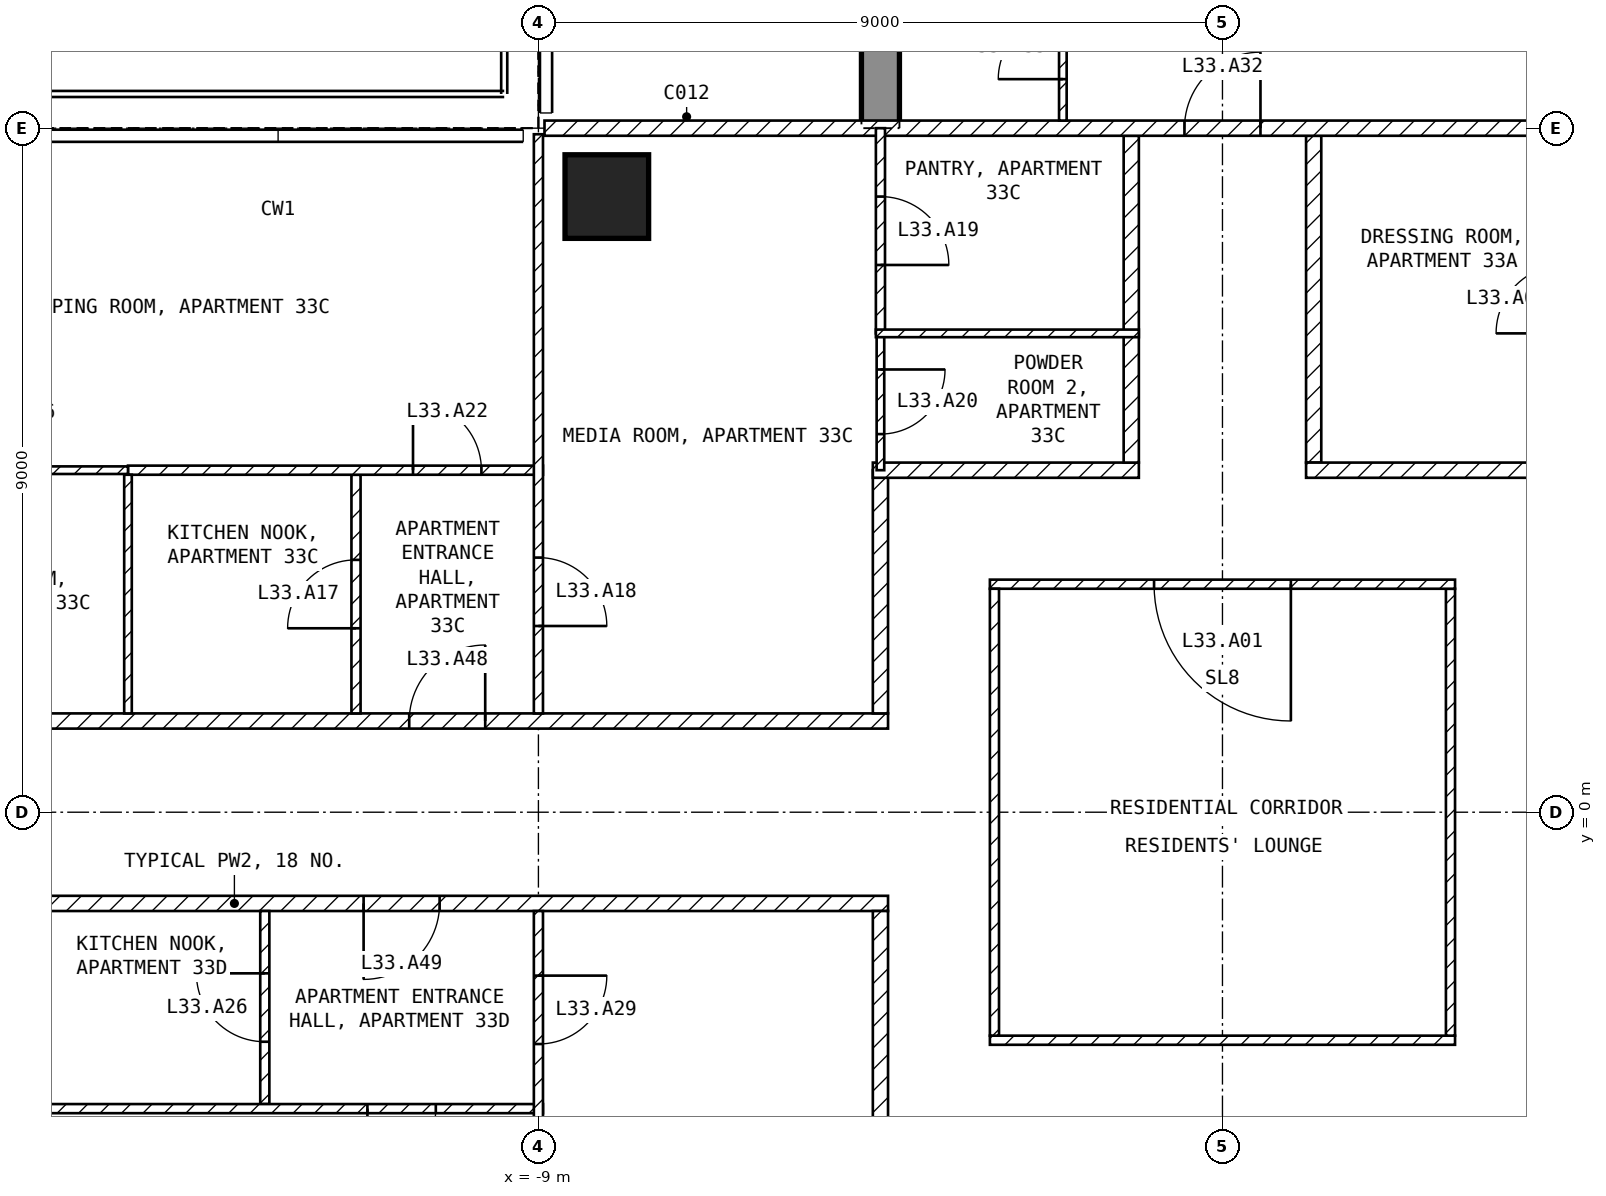
"""IFC4 building model, lengths in metres.
Left out: names, types, materials, properties, quantities, classifications, styles, units other than length and angle.
Written with IfcOpenShell. Run it as: python <this file> out.ifc"""

import sys

from ifc_helpers import new_model, si_unit, direction, frame, frame_2d, origin, origin_2d, place, context, subcontext, project, spatial, polyline, rectangle, outline, extrude, element, fill, save


model = new_model("IFC4")
c1 = context("Model", 3, precision=1e-05, world=origin(), true_north=direction((0.0, 1.0)))
c2 = subcontext(c1, "Body", "Model", "MODEL_VIEW")
j1 = project(units=[si_unit("LENGTHUNIT", "METRE"), si_unit("PLANEANGLEUNIT", "RADIAN")], contexts=[c1])
p1 = place(None, origin())
s1 = spatial("IfcSite", under=j1, at=p1, CompositionType="ELEMENT")
p2 = place(p1, origin())
s2 = spatial("IfcBuilding", under=s1, at=p2, CompositionType="ELEMENT")
p3 = place(p2, frame((0.0, 0.0, 137.4)))
s3 = spatial("IfcBuildingStorey", under=s2, at=p3, CompositionType="ELEMENT", Elevation=137.4)
p4 = place(p3, frame((-8.1, 8.1, -0.25), z_axis=(0.0, 0.0, 1.0), x_axis=(1.0, 0.0, 0.0)))
e1 = element("IfcColumn", 1, at=p4, inside=s3, PredefinedType="COLUMN", context=c2, shape_type="SweptSolid", body=[
    extrude(rectangle(XDim=1.1, YDim=1.1, at=origin_2d()), origin(), (0.0, 0.0, 1.0), 3.5),
])
p5 = place(p3, frame((-4.75, 9.0, -0.25), z_axis=(1.0, 0.0, 0.0), x_axis=(0.0, 1.0, 0.0)))
e2 = element("IfcWall", 2, at=p5, inside=s3, PredefinedType="SHEAR", context=c2, shape_type="SweptSolid", body=[
    extrude(outline(polyline([(0.0, 0.0), (2.1, 0.0), (2.1, 2.65), (4.5, 2.65), (4.5, 0.0), (9.9, 0.0), (9.9, 2.65), (12.3, 2.65), (12.3, 0.0), (16.55, 0.0), (16.55, 3.5), (0.0, 3.5), (0.0, 0.0)])), origin(), (0.0, 0.0, 1.0), 0.5),
])
p6 = place(p3, frame((-3.06, -3.0, 0.0), z_axis=(0.0, 0.0, 1.0), x_axis=(1.0, 0.0, 0.0)))
e3 = element("IfcWall", 3, at=p6, inside=s3, PredefinedType="PARTITIONING", context=c2, shape_type="SweptSolid", body=[
    extrude(rectangle(XDim=6.12, YDim=0.12, at=frame_2d((3.06, 0.0))), origin(), (0.0, 0.0, 1.0), 3.25),
])
p7 = place(p3, frame((3.0, -2.94, 0.0), z_axis=(0.0, 0.0, 1.0), x_axis=(0.0, 1.0, 0.0)))
e4 = element("IfcWall", 4, at=p7, inside=s3, PredefinedType="PARTITIONING", context=c2, shape_type="SweptSolid", body=[
    extrude(rectangle(XDim=5.88, YDim=0.12, at=frame_2d((2.94, 0.0))), origin(), (0.0, 0.0, 1.0), 3.25),
])
p8 = place(p3, frame((3.06, 3.0, 0.0), z_axis=(0.0, 0.0, 1.0), x_axis=(-1.0, 0.0, 0.0)))
e5 = element("IfcWall", 5, at=p8, inside=s3, PredefinedType="PARTITIONING", context=c2, shape_type="SweptSolid", body=[
    extrude(rectangle(XDim=6.12, YDim=0.12, at=frame_2d((3.06, 0.0))), origin(), (0.0, 0.0, 1.0), 3.25),
])
p9 = place(p8, frame((2.16, 0.0, 0.0)))
e6 = element("IfcOpeningElement", 6, at=p9, cuts=e5, PredefinedType="OPENING", context=c2, shape_type="SweptSolid", body=[
    extrude(rectangle(XDim=1.8, YDim=2.1, at=frame_2d((0.9, 1.05))), frame((0.0, 0.07, 0.0), z_axis=(0.0, -1.0, 0.0), x_axis=(1.0, 0.0, 0.0)), (0.0, 0.0, 1.0), 0.14),
])
p10 = place(p3, frame((-3.0, 2.94, 0.0), z_axis=(0.0, 0.0, 1.0), x_axis=(0.0, -1.0, 0.0)))
e7 = element("IfcWall", 7, at=p10, inside=s3, PredefinedType="PARTITIONING", context=c2, shape_type="SweptSolid", body=[
    extrude(rectangle(XDim=5.88, YDim=0.12, at=frame_2d((2.94, 0.0))), origin(), (0.0, 0.0, 1.0), 3.25),
])
p11 = place(p3, frame((1.2, 8.9, 0.0), z_axis=(0.0, 0.0, 1.0), x_axis=(0.0, -1.0, 0.0)))
e8 = element("IfcWall", 8, at=p11, inside=s3, PredefinedType="PARTITIONING", context=c2, shape_type="SweptSolid", body=[
    extrude(rectangle(XDim=4.3, YDim=0.2, at=frame_2d((2.15, 0.0))), origin(), (0.0, 0.0, 1.0), 3.25),
])
p12 = place(p3, frame((1.1, 4.5, 0.0), z_axis=(0.0, 0.0, 1.0), x_axis=(1.0, 0.0, 0.0)))
e9 = element("IfcWall", 9, at=p12, inside=s3, PredefinedType="PARTITIONING", context=c2, shape_type="SweptSolid", body=[
    extrude(rectangle(XDim=3.5, YDim=0.2, at=frame_2d((1.75, 0.0))), origin(), (0.0, 0.0, 1.0), 3.25),
])
p13 = place(p3, frame((-21.6, 1.2, 0.0), z_axis=(0.0, 0.0, 1.0), x_axis=(1.0, 0.0, 0.0)))
e10 = element("IfcWall", 10, at=p13, inside=s3, PredefinedType="PARTITIONING", context=c2, shape_type="SweptSolid", body=[
    extrude(rectangle(XDim=17.2, YDim=0.2, at=frame_2d((8.6, 0.0))), origin(), (0.0, 0.0, 1.0), 3.25),
])
p14 = place(p13, frame((10.9, 0.0, 0.0)))
e11 = element("IfcOpeningElement", 11, at=p14, cuts=e10, PredefinedType="OPENING", context=c2, shape_type="SweptSolid", body=[
    extrude(rectangle(XDim=1.0, YDim=2.1, at=frame_2d((0.5, 1.05))), frame((0.0, 0.11, 0.0), z_axis=(0.0, -1.0, 0.0), x_axis=(1.0, 0.0, 0.0)), (0.0, 0.0, 1.0), 0.22),
])
p15 = place(p3, frame((-4.5, 1.3, 0.0), z_axis=(0.0, 0.0, 1.0), x_axis=(0.0, 1.0, 0.0)))
e12 = element("IfcWall", 12, at=p15, inside=s3, PredefinedType="PARTITIONING", context=c2, shape_type="SweptSolid", body=[
    extrude(rectangle(XDim=3.2, YDim=0.2, at=frame_2d((1.6, 0.0))), origin(), (0.0, 0.0, 1.0), 3.25),
])
p16 = place(p3, frame((-4.6, 4.5, 0.0), z_axis=(0.0, 0.0, 1.0), x_axis=(1.0, 0.0, 0.0)))
e13 = element("IfcWall", 13, at=p16, inside=s3, PredefinedType="PARTITIONING", context=c2, shape_type="SweptSolid", body=[
    extrude(rectangle(XDim=3.5, YDim=0.2, at=frame_2d((1.75, 0.0))), origin(), (0.0, 0.0, 1.0), 3.25),
])
p17 = place(p3, frame((-1.2, 4.6, 0.0), z_axis=(0.0, 0.0, 1.0), x_axis=(0.0, 1.0, 0.0)))
e14 = element("IfcWall", 14, at=p17, inside=s3, PredefinedType="PARTITIONING", context=c2, shape_type="SweptSolid", body=[
    extrude(rectangle(XDim=4.3, YDim=0.2, at=frame_2d((2.15, 0.0))), origin(), (0.0, 0.0, 1.0), 3.25),
])
p18 = place(p3, frame((-4.4, -1.2, 0.0), z_axis=(0.0, 0.0, 1.0), x_axis=(-1.0, 0.0, 0.0)))
e15 = element("IfcWall", 15, at=p18, inside=s3, PredefinedType="PARTITIONING", context=c2, shape_type="SweptSolid", body=[
    extrude(rectangle(XDim=17.2, YDim=0.2, at=frame_2d((8.6, 0.0))), origin(), (0.0, 0.0, 1.0), 3.25),
])
p19 = place(p18, frame((5.9, 0.0, 0.0)))
e16 = element("IfcOpeningElement", 16, at=p19, cuts=e15, PredefinedType="OPENING", context=c2, shape_type="SweptSolid", body=[
    extrude(rectangle(XDim=1.0, YDim=2.1, at=frame_2d((0.5, 1.05))), frame((0.0, 0.11, 0.0), z_axis=(0.0, -1.0, 0.0), x_axis=(1.0, 0.0, 0.0)), (0.0, 0.0, 1.0), 0.22),
])
p20 = place(p3, frame((-4.5, -4.5, 0.0), z_axis=(0.0, 0.0, 1.0), x_axis=(0.0, 1.0, 0.0)))
e17 = element("IfcWall", 17, at=p20, inside=s3, PredefinedType="PARTITIONING", context=c2, shape_type="SweptSolid", body=[
    extrude(rectangle(XDim=3.2, YDim=0.2, at=frame_2d((1.6, 0.0))), origin(), (0.0, 0.0, 1.0), 3.25),
])
p21 = place(p3, frame((-8.92, 9.0, 0.0), z_axis=(0.0, 0.0, 1.0), x_axis=(1.0, 0.0, 0.0)))
e18 = element("IfcWall", 18, at=p21, inside=s3, PredefinedType="PARTITIONING", context=c2, shape_type="SweptSolid", body=[
    extrude(rectangle(XDim=17.84, YDim=0.2, at=frame_2d((8.92, 0.0))), origin(), (0.0, 0.0, 1.0), 3.25),
])
p22 = place(p21, frame((8.42, 0.0, 0.0)))
e19 = element("IfcOpeningElement", 19, at=p22, cuts=e18, PredefinedType="OPENING", context=c2, shape_type="SweptSolid", body=[
    extrude(rectangle(XDim=1.0, YDim=2.1, at=frame_2d((0.5, 1.05))), frame((0.0, 0.11, 0.0), z_axis=(0.0, -1.0, 0.0), x_axis=(1.0, 0.0, 0.0)), (0.0, 0.0, 1.0), 0.22),
])
p23 = place(p3, frame((-11.4, 1.3, 0.0), z_axis=(0.0, 0.0, 1.0), x_axis=(0.0, 1.0, 0.0)))
e20 = element("IfcWall", 20, at=p23, inside=s3, PredefinedType="PARTITIONING", context=c2, shape_type="SweptSolid", body=[
    extrude(rectangle(XDim=3.14, YDim=0.12, at=frame_2d((1.57, 0.0))), origin(), (0.0, 0.0, 1.0), 3.25),
])
p24 = place(p23, frame((1.12, 0.0, 0.0)))
e21 = element("IfcOpeningElement", 21, at=p24, cuts=e20, PredefinedType="OPENING", context=c2, shape_type="SweptSolid", body=[
    extrude(rectangle(XDim=0.9, YDim=2.1, at=frame_2d((0.45, 1.05))), frame((0.0, 0.07, 0.0), z_axis=(0.0, -1.0, 0.0), x_axis=(1.0, 0.0, 0.0)), (0.0, 0.0, 1.0), 0.14),
])
p25 = place(p3, frame((-14.4, 4.5, 0.0), z_axis=(0.0, 0.0, 1.0), x_axis=(1.0, 0.0, 0.0)))
e22 = element("IfcWall", 22, at=p25, inside=s3, PredefinedType="PARTITIONING", context=c2, shape_type="SweptSolid", body=[
    extrude(rectangle(XDim=5.46, YDim=0.12, at=frame_2d((2.73, 0.0))), origin(), (0.0, 0.0, 1.0), 3.25),
])
p26 = place(p25, frame((3.75, 0.0, 0.0)))
e23 = element("IfcOpeningElement", 23, at=p26, cuts=e22, PredefinedType="OPENING", context=c2, shape_type="SweptSolid", body=[
    extrude(rectangle(XDim=0.9, YDim=2.1, at=frame_2d((0.45, 1.05))), frame((0.0, 0.07, 0.0), z_axis=(0.0, -1.0, 0.0), x_axis=(1.0, 0.0, 0.0)), (0.0, 0.0, 1.0), 0.14),
])
p27 = place(p3, frame((-9.0, 8.92, 0.0), z_axis=(0.0, 0.0, 1.0), x_axis=(0.0, -1.0, 0.0)))
e24 = element("IfcWall", 24, at=p27, inside=s3, PredefinedType="PARTITIONING", context=c2, shape_type="SweptSolid", body=[
    extrude(rectangle(XDim=7.62, YDim=0.12, at=frame_2d((3.81, 0.0))), origin(), (0.0, 0.0, 1.0), 3.25),
])
p28 = place(p27, frame((5.57, 0.0, 0.0)))
e25 = element("IfcOpeningElement", 25, at=p28, cuts=e24, PredefinedType="OPENING", context=c2, shape_type="SweptSolid", body=[
    extrude(rectangle(XDim=0.9, YDim=2.1, at=frame_2d((0.45, 1.05))), frame((0.0, 0.07, 0.0), z_axis=(0.0, -1.0, 0.0), x_axis=(1.0, 0.0, 0.0)), (0.0, 0.0, 1.0), 0.14),
])
p29 = place(p3, frame((-14.4, 1.3, 0.0), z_axis=(0.0, 0.0, 1.0), x_axis=(0.0, 1.0, 0.0)))
e26 = element("IfcWall", 26, at=p29, inside=s3, PredefinedType="PARTITIONING", context=c2, shape_type="SweptSolid", body=[
    extrude(rectangle(XDim=3.14, YDim=0.1, at=frame_2d((1.57, 0.0))), origin(), (0.0, 0.0, 1.0), 3.25),
])
p30 = place(p3, frame((-17.4, 4.5, 0.0), z_axis=(0.0, 0.0, 1.0), x_axis=(1.0, 0.0, 0.0)))
e27 = element("IfcWall", 27, at=p30, inside=s3, PredefinedType="PARTITIONING", context=c2, shape_type="SweptSolid", body=[
    extrude(rectangle(XDim=3.0, YDim=0.1, at=frame_2d((1.5, 0.0))), origin(), (0.0, 0.0, 1.0), 3.25),
])
p31 = place(p30, frame((1.075, 0.0, 0.0)))
e28 = element("IfcOpeningElement", 28, at=p31, cuts=e27, PredefinedType="OPENING", context=c2, shape_type="SweptSolid", body=[
    extrude(rectangle(XDim=0.85, YDim=2.1, at=frame_2d((0.425, 1.05))), frame((0.0, 0.06, 0.0), z_axis=(0.0, -1.0, 0.0), x_axis=(1.0, 0.0, 0.0)), (0.0, 0.0, 1.0), 0.12),
])
p32 = place(p3, frame((-4.5, 6.3, 0.0), z_axis=(0.0, 0.0, 1.0), x_axis=(0.0, -1.0, 0.0)))
e29 = element("IfcWall", 29, at=p32, inside=s3, PredefinedType="PARTITIONING", context=c2, shape_type="SweptSolid", body=[
    extrude(rectangle(XDim=1.8, YDim=0.1, at=frame_2d((0.9, 0.0))), origin(), (0.0, 0.0, 1.0), 3.25),
])
p33 = place(p32, frame((0.475, 0.0, 0.0)))
e30 = element("IfcOpeningElement", 30, at=p33, cuts=e29, PredefinedType="OPENING", context=c2, shape_type="SweptSolid", body=[
    extrude(rectangle(XDim=0.85, YDim=2.1, at=frame_2d((0.425, 1.05))), frame((0.0, 0.06, 0.0), z_axis=(0.0, -1.0, 0.0), x_axis=(1.0, 0.0, 0.0)), (0.0, 0.0, 1.0), 0.12),
])
p34 = place(p3, frame((-4.5, 9.0, 0.0), z_axis=(0.0, 0.0, 1.0), x_axis=(0.0, -1.0, 0.0)))
e31 = element("IfcWall", 31, at=p34, inside=s3, PredefinedType="PARTITIONING", context=c2, shape_type="SweptSolid", body=[
    extrude(rectangle(XDim=2.7, YDim=0.12, at=frame_2d((1.35, 0.0))), origin(), (0.0, 0.0, 1.0), 3.25),
])
p35 = place(p34, frame((0.9, 0.0, 0.0)))
e32 = element("IfcOpeningElement", 32, at=p35, cuts=e31, PredefinedType="OPENING", context=c2, shape_type="SweptSolid", body=[
    extrude(rectangle(XDim=0.9, YDim=2.1, at=frame_2d((0.45, 1.05))), frame((0.0, 0.07, 0.0), z_axis=(0.0, -1.0, 0.0), x_axis=(1.0, 0.0, 0.0)), (0.0, 0.0, 1.0), 0.14),
])
p36 = place(p3, frame((-4.56, 6.3, 0.0), z_axis=(0.0, 0.0, 1.0), x_axis=(1.0, 0.0, 0.0)))
e33 = element("IfcWall", 33, at=p36, inside=s3, PredefinedType="PARTITIONING", context=c2, shape_type="SweptSolid", body=[
    extrude(rectangle(XDim=3.46, YDim=0.1, at=frame_2d((1.73, 0.0))), origin(), (0.0, 0.0, 1.0), 3.25),
])
p37 = place(p3, frame((-12.6, -3.84, 0.0), z_axis=(0.0, 0.0, 1.0), x_axis=(0.0, 1.0, 0.0)))
e34 = element("IfcWall", 34, at=p37, inside=s3, PredefinedType="PARTITIONING", context=c2, shape_type="SweptSolid", body=[
    extrude(rectangle(XDim=2.54, YDim=0.12, at=frame_2d((1.27, 0.0))), origin(), (0.0, 0.0, 1.0), 3.25),
])
p38 = place(p37, frame((0.82, 0.0, 0.0)))
e35 = element("IfcOpeningElement", 35, at=p38, cuts=e34, PredefinedType="OPENING", context=c2, shape_type="SweptSolid", body=[
    extrude(rectangle(XDim=0.9, YDim=2.1, at=frame_2d((0.45, 1.05))), frame((0.0, 0.07, 0.0), z_axis=(0.0, -1.0, 0.0), x_axis=(1.0, 0.0, 0.0)), (0.0, 0.0, 1.0), 0.14),
])
p39 = place(p3, frame((-8.94, -3.9, 0.0), z_axis=(0.0, 0.0, 1.0), x_axis=(-1.0, 0.0, 0.0)))
e36 = element("IfcWall", 36, at=p39, inside=s3, PredefinedType="PARTITIONING", context=c2, shape_type="SweptSolid", body=[
    extrude(rectangle(XDim=8.46, YDim=0.12, at=frame_2d((4.23, 0.0))), origin(), (0.0, 0.0, 1.0), 3.25),
])
p40 = place(p39, frame((7.11, 0.0, 0.0)))
e37 = element("IfcOpeningElement", 37, at=p40, cuts=e36, PredefinedType="OPENING", context=c2, shape_type="SweptSolid", body=[
    extrude(rectangle(XDim=0.9, YDim=2.1, at=frame_2d((0.45, 1.05))), frame((0.0, 0.07, 0.0), z_axis=(0.0, -1.0, 0.0), x_axis=(1.0, 0.0, 0.0)), (0.0, 0.0, 1.0), 0.14),
])
p41 = place(p39, frame((1.41, 0.0, 0.0)))
e38 = element("IfcOpeningElement", 38, at=p41, cuts=e36, PredefinedType="OPENING", context=c2, shape_type="SweptSolid", body=[
    extrude(rectangle(XDim=0.9, YDim=2.1, at=frame_2d((0.45, 1.05))), frame((0.0, 0.07, 0.0), z_axis=(0.0, -1.0, 0.0), x_axis=(1.0, 0.0, 0.0)), (0.0, 0.0, 1.0), 0.14),
])
p42 = place(p3, frame((-9.0, -1.3, 0.0), z_axis=(0.0, 0.0, 1.0), x_axis=(0.0, -1.0, 0.0)))
e39 = element("IfcWall", 39, at=p42, inside=s3, PredefinedType="PARTITIONING", context=c2, shape_type="SweptSolid", body=[
    extrude(rectangle(XDim=7.62, YDim=0.12, at=frame_2d((3.81, 0.0))), origin(), (0.0, 0.0, 1.0), 3.25),
])
p43 = place(p42, frame((0.85, 0.0, 0.0)))
e40 = element("IfcOpeningElement", 40, at=p43, cuts=e39, PredefinedType="OPENING", context=c2, shape_type="SweptSolid", body=[
    extrude(rectangle(XDim=0.9, YDim=2.1, at=frame_2d((0.45, 1.05))), frame((0.0, 0.07, 0.0), z_axis=(0.0, -1.0, 0.0), x_axis=(1.0, 0.0, 0.0)), (0.0, 0.0, 1.0), 0.14),
])
p44 = place(p3, frame((-2.1, 9.1, 0.0), z_axis=(0.0, 0.0, 1.0), x_axis=(0.0, 1.0, 0.0)))
e41 = element("IfcWall", 41, at=p44, inside=s3, PredefinedType="PARTITIONING", context=c2, shape_type="SweptSolid", body=[
    extrude(rectangle(XDim=1.94, YDim=0.1, at=frame_2d((0.97, 0.0))), origin(), (0.0, 0.0, 1.0), 3.25),
])
p45 = place(p44, frame((0.545, 0.0, 0.0)))
e42 = element("IfcOpeningElement", 42, at=p45, cuts=e41, PredefinedType="OPENING", context=c2, shape_type="SweptSolid", body=[
    extrude(rectangle(XDim=0.85, YDim=2.1, at=frame_2d((0.425, 1.05))), frame((0.0, 0.06, 0.0), z_axis=(0.0, -1.0, 0.0), x_axis=(1.0, 0.0, 0.0)), (0.0, 0.0, 1.0), 0.12),
])
p46 = place(p9, origin())
e43 = element("IfcDoor", 43, at=p46, inside=s3, OperationType="SINGLE_SWING_LEFT", PredefinedType="DOOR", context=c2, shape_type="SweptSolid", body=[
    extrude(rectangle(XDim=1.8, YDim=2.1, at=frame_2d((0.9, 1.05))), frame((0.0, 0.025, 0.0), z_axis=(0.0, -1.0, 0.0), x_axis=(1.0, 0.0, 0.0)), (0.0, 0.0, 1.0), 0.05),
])
fill(e6, e43)
p47 = place(p24, origin())
e44 = element("IfcDoor", 44, at=p47, inside=s3, OperationType="SINGLE_SWING_LEFT", PredefinedType="DOOR", context=c2, shape_type="SweptSolid", body=[
    extrude(rectangle(XDim=0.9, YDim=2.1, at=frame_2d((0.45, 1.05))), frame((0.0, 0.025, 0.0), z_axis=(0.0, -1.0, 0.0), x_axis=(1.0, 0.0, 0.0)), (0.0, 0.0, 1.0), 0.05),
])
fill(e21, e44)
p48 = place(p28, origin())
e45 = element("IfcDoor", 45, at=p48, inside=s3, OperationType="SINGLE_SWING_RIGHT", PredefinedType="DOOR", context=c2, shape_type="SweptSolid", body=[
    extrude(rectangle(XDim=0.9, YDim=2.1, at=frame_2d((0.45, 1.05))), frame((0.0, 0.025, 0.0), z_axis=(0.0, -1.0, 0.0), x_axis=(1.0, 0.0, 0.0)), (0.0, 0.0, 1.0), 0.05),
])
fill(e25, e45)
p49 = place(p35, origin())
e46 = element("IfcDoor", 46, at=p49, inside=s3, OperationType="SINGLE_SWING_RIGHT", PredefinedType="DOOR", context=c2, shape_type="SweptSolid", body=[
    extrude(rectangle(XDim=0.9, YDim=2.1, at=frame_2d((0.45, 1.05))), frame((0.0, 0.025, 0.0), z_axis=(0.0, -1.0, 0.0), x_axis=(1.0, 0.0, 0.0)), (0.0, 0.0, 1.0), 0.05),
])
fill(e32, e46)
p50 = place(p33, origin())
e47 = element("IfcDoor", 47, at=p50, inside=s3, OperationType="SINGLE_SWING_LEFT", PredefinedType="DOOR", context=c2, shape_type="SweptSolid", body=[
    extrude(rectangle(XDim=0.85, YDim=2.1, at=frame_2d((0.425, 1.05))), frame((0.0, 0.025, 0.0), z_axis=(0.0, -1.0, 0.0), x_axis=(1.0, 0.0, 0.0)), (0.0, 0.0, 1.0), 0.05),
])
fill(e30, e47)
p51 = place(p26, origin())
e48 = element("IfcDoor", 48, at=p51, inside=s3, OperationType="SINGLE_SWING_LEFT", PredefinedType="DOOR", context=c2, shape_type="SweptSolid", body=[
    extrude(rectangle(XDim=0.9, YDim=2.1, at=frame_2d((0.45, 1.05))), frame((0.0, 0.025, 0.0), z_axis=(0.0, -1.0, 0.0), x_axis=(1.0, 0.0, 0.0)), (0.0, 0.0, 1.0), 0.05),
])
fill(e23, e48)
p52 = place(p38, origin())
e49 = element("IfcDoor", 49, at=p52, inside=s3, OperationType="SINGLE_SWING_RIGHT", PredefinedType="DOOR", context=c2, shape_type="SweptSolid", body=[
    extrude(rectangle(XDim=0.9, YDim=2.1, at=frame_2d((0.45, 1.05))), frame((0.0, 0.025, 0.0), z_axis=(0.0, -1.0, 0.0), x_axis=(1.0, 0.0, 0.0)), (0.0, 0.0, 1.0), 0.05),
])
fill(e35, e49)
p53 = place(p43, origin())
e50 = element("IfcDoor", 50, at=p53, inside=s3, OperationType="SINGLE_SWING_LEFT", PredefinedType="DOOR", context=c2, shape_type="SweptSolid", body=[
    extrude(rectangle(XDim=0.9, YDim=2.1, at=frame_2d((0.45, 1.05))), frame((0.0, 0.025, 0.0), z_axis=(0.0, -1.0, 0.0), x_axis=(1.0, 0.0, 0.0)), (0.0, 0.0, 1.0), 0.05),
])
fill(e40, e50)
p54 = place(p41, origin())
e51 = element("IfcDoor", 51, at=p54, inside=s3, OperationType="SINGLE_SWING_RIGHT", PredefinedType="DOOR", context=c2, shape_type="SweptSolid", body=[
    extrude(rectangle(XDim=0.9, YDim=2.1, at=frame_2d((0.45, 1.05))), frame((0.0, 0.025, 0.0), z_axis=(0.0, -1.0, 0.0), x_axis=(1.0, 0.0, 0.0)), (0.0, 0.0, 1.0), 0.05),
])
fill(e38, e51)
p55 = place(p22, origin())
e52 = element("IfcDoor", 52, at=p55, inside=s3, OperationType="SINGLE_SWING_RIGHT", PredefinedType="DOOR", context=c2, shape_type="SweptSolid", body=[
    extrude(rectangle(XDim=1.0, YDim=2.1, at=frame_2d((0.5, 1.05))), frame((0.0, 0.025, 0.0), z_axis=(0.0, -1.0, 0.0), x_axis=(1.0, 0.0, 0.0)), (0.0, 0.0, 1.0), 0.05),
])
fill(e19, e52)
p56 = place(p45, origin())
e53 = element("IfcDoor", 53, at=p56, inside=s3, OperationType="SINGLE_SWING_LEFT", PredefinedType="DOOR", context=c2, shape_type="SweptSolid", body=[
    extrude(rectangle(XDim=0.85, YDim=2.1, at=frame_2d((0.425, 1.05))), frame((0.0, 0.025, 0.0), z_axis=(0.0, -1.0, 0.0), x_axis=(1.0, 0.0, 0.0)), (0.0, 0.0, 1.0), 0.05),
])
fill(e42, e53)
p57 = place(p14, origin())
e54 = element("IfcDoor", 54, at=p57, inside=s3, OperationType="SINGLE_SWING_RIGHT", PredefinedType="DOOR", context=c2, shape_type="SweptSolid", body=[
    extrude(rectangle(XDim=1.0, YDim=2.1, at=frame_2d((0.5, 1.05))), frame((0.0, 0.025, 0.0), z_axis=(0.0, -1.0, 0.0), x_axis=(1.0, 0.0, 0.0)), (0.0, 0.0, 1.0), 0.05),
])
fill(e11, e54)
p58 = place(p19, origin())
e55 = element("IfcDoor", 55, at=p58, inside=s3, OperationType="SINGLE_SWING_RIGHT", PredefinedType="DOOR", context=c2, shape_type="SweptSolid", body=[
    extrude(rectangle(XDim=1.0, YDim=2.1, at=frame_2d((0.5, 1.05))), frame((0.0, 0.025, 0.0), z_axis=(0.0, -1.0, 0.0), x_axis=(1.0, 0.0, 0.0)), (0.0, 0.0, 1.0), 0.05),
])
fill(e16, e55)
save(model, sys.argv[1])
